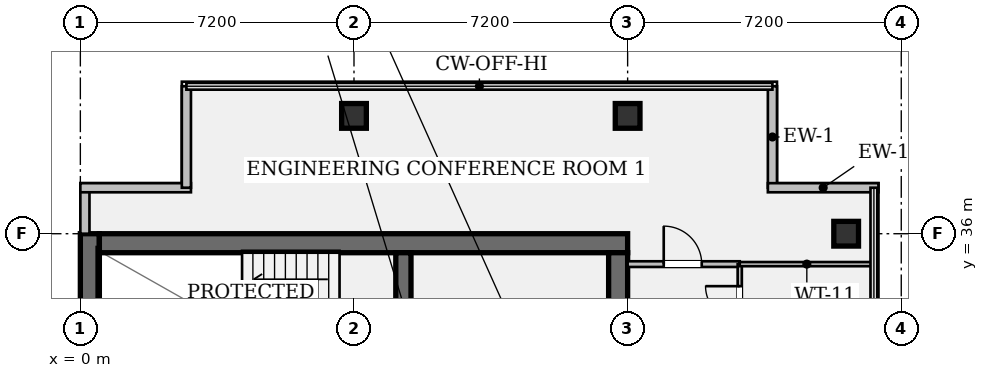
"""IFC4 building model, lengths in metres.
Left out: names, types, materials, properties, quantities, classifications, styles, units other than length and angle.
Written with IfcOpenShell. Run it as: python <this file> out.ifc"""

import sys

from ifc_helpers import new_model, si_unit, direction, frame, frame_2d, origin, origin_2d, place, context, subcontext, project, spatial, rectangle, hollow_rectangle, extrude, element, fill, save


model = new_model("IFC4")
c1 = context("Model", 3, precision=1e-05, world=origin(), true_north=direction((0.0, 1.0)))
c2 = subcontext(c1, "Body", "Model", "MODEL_VIEW")
j1 = project(units=[si_unit("LENGTHUNIT", "METRE"), si_unit("PLANEANGLEUNIT", "RADIAN")], contexts=[c1])
p1 = place(None, origin())
s1 = spatial("IfcSite", under=j1, at=p1, CompositionType="ELEMENT")
p2 = place(p1, origin())
s2 = spatial("IfcBuilding", under=s1, at=p2, CompositionType="ELEMENT")
p3 = place(p2, frame((0.0, 0.0, 279.65)))
s3 = spatial("IfcBuildingStorey", under=s2, at=p3, CompositionType="ELEMENT", Elevation=279.65)
p4 = place(p3, frame((0.25, 7.2, 0.0), z_axis=(0.0, 0.0, 1.0), x_axis=(0.0, 1.0, 0.0)))
e1 = element("IfcWall", 1, at=p4, inside=s3, PredefinedType="SHEAR", context=c2, shape_type="SweptSolid", body=[
    extrude(rectangle(XDim=28.8, YDim=0.5, at=frame_2d((14.4, 0.0))), origin(), (0.0, 0.0, 1.0), 3.24),
])
p5 = place(p3, frame((0.5, 35.75, 0.0), z_axis=(0.0, 0.0, 1.0), x_axis=(1.0, 0.0, 0.0)))
e2 = element("IfcWall", 2, at=p5, inside=s3, PredefinedType="SHEAR", context=c2, shape_type="SweptSolid", body=[
    extrude(rectangle(XDim=13.9, YDim=0.5, at=frame_2d((6.95, 0.0))), origin(), (0.0, 0.0, 1.0), 3.24),
])
p6 = place(p3, frame((14.15, 35.5, 0.0), z_axis=(0.0, 0.0, 1.0), x_axis=(0.0, -1.0, 0.0)))
e3 = element("IfcWall", 3, at=p6, inside=s3, PredefinedType="SHEAR", context=c2, shape_type="SweptSolid", body=[
    extrude(rectangle(XDim=27.8, YDim=0.5, at=frame_2d((13.9, 0.0))), origin(), (0.0, 0.0, 1.0), 3.24),
])
p7 = place(p6, frame((1.4, 0.0, 0.0)))
e4 = element("IfcOpeningElement", 4, at=p7, cuts=e3, PredefinedType="OPENING", context=c2, shape_type="SweptSolid", body=[
    extrude(rectangle(XDim=1.2, YDim=2.15, at=frame_2d((0.6, 1.075))), frame((0.0, 0.262, 0.0), z_axis=(0.0, -1.0, 0.0), x_axis=(1.0, 0.0, 0.0)), (0.0, 0.0, 1.0), 0.524),
])
p8 = place(p6, frame((25.35, 0.0, 0.0)))
e5 = element("IfcOpeningElement", 5, at=p8, cuts=e3, PredefinedType="OPENING", context=c2, shape_type="SweptSolid", body=[
    extrude(rectangle(XDim=1.2, YDim=2.15, at=frame_2d((0.6, 1.075))), frame((0.0, 0.262, 0.0), z_axis=(0.0, -1.0, 0.0), x_axis=(1.0, 0.0, 0.0)), (0.0, 0.0, 1.0), 0.524),
])
p9 = place(p6, frame((14.7, 0.0, 0.0)))
e6 = element("IfcOpeningElement", 6, at=p9, cuts=e3, PredefinedType="OPENING", context=c2, shape_type="SweptSolid", body=[
    extrude(rectangle(XDim=1.6, YDim=2.2, at=frame_2d((0.8, 1.1))), frame((0.0, 0.262, 0.0), z_axis=(0.0, -1.0, 0.0), x_axis=(1.0, 0.0, 0.0)), (0.0, 0.0, 1.0), 0.524),
])
p10 = place(p3, frame((8.5, 31.72, 0.0), z_axis=(0.0, 0.0, 1.0), x_axis=(0.0, 1.0, 0.0)))
e7 = element("IfcWall", 7, at=p10, inside=s3, PredefinedType="SHEAR", context=c2, shape_type="SweptSolid", body=[
    extrude(rectangle(XDim=3.78, YDim=0.4, at=frame_2d((1.89, 0.0))), origin(), (0.0, 0.0, 1.0), 3.24),
])
p11 = place(p10, frame((0.9, 0.0, 0.0)))
e8 = element("IfcOpeningElement", 8, at=p11, cuts=e7, PredefinedType="OPENING", context=c2, shape_type="SweptSolid", body=[
    extrude(rectangle(XDim=1.1, YDim=2.15, at=frame_2d((0.55, 1.075))), frame((0.0, 0.212, 0.0), z_axis=(0.0, -1.0, 0.0), x_axis=(1.0, 0.0, 0.0)), (0.0, 0.0, 1.0), 0.424),
])
for number, where, z_axis, x_axis in (
    (9, (7.2, 39.1, 0.0), (0.0, 0.0, 1.0), (1.0, 0.0, 0.0)),
    (10, (14.4, 39.1, 0.0), (0.0, 0.0, 1.0), (1.0, 0.0, 0.0)),
    (11, (20.15, 36.0, 0.0), (0.0, 0.0, 1.0), (1.0, 0.0, 0.0)),
):
    element("IfcColumn", number, at=place(p3, frame(where, z_axis=z_axis, x_axis=x_axis)), inside=s3, PredefinedType="COLUMN", context=c2, shape_type="SweptSolid", body=[
        extrude(hollow_rectangle(XDim=0.65, YDim=0.65, WallThickness=0.04, at=origin_2d()), origin(), (0.0, 0.0, 1.0), 3.24),
    ])
p12 = place(p3, frame((0.12, 36.0, 0.0), z_axis=(0.0, 0.0, 1.0), x_axis=(0.0, 1.0, 0.0)))
e12 = element("IfcWall", 12, at=p12, inside=s3, PredefinedType="STANDARD", context=c2, shape_type="SweptSolid", body=[
    extrude(rectangle(XDim=1.21, YDim=0.24, at=frame_2d((0.605, 0.0))), origin(), (0.0, 0.0, 1.0), 3.24),
])
p13 = place(p3, frame((0.0, 37.21, 0.0), z_axis=(0.0, 0.0, 1.0), x_axis=(1.0, 0.0, 0.0)))
e13 = element("IfcWall", 13, at=p13, inside=s3, PredefinedType="STANDARD", context=c2, shape_type="SweptSolid", body=[
    extrude(rectangle(XDim=2.91, YDim=0.24, at=frame_2d((1.455, 0.0))), origin(), (0.0, 0.0, 1.0), 3.24),
])
for number, where, z_axis, x_axis in (
    (14, (2.79, 37.21, 0.0), (0.0, 0.0, 1.0), (0.0, 1.0, 0.0)),
    (15, (18.21, 39.88, 0.0), (0.0, 0.0, 1.0), (0.0, -1.0, 0.0)),
):
    element("IfcWall", number, at=place(p3, frame(where, z_axis=z_axis, x_axis=x_axis)), inside=s3, PredefinedType="STANDARD", context=c2, shape_type="SweptSolid", body=[
        extrude(rectangle(XDim=2.67, YDim=0.24, at=frame_2d((1.335, 0.0))), origin(), (0.0, 0.0, 1.0), 3.24),
    ])
p14 = place(p3, frame((18.09, 37.21, 0.0), z_axis=(0.0, 0.0, 1.0), x_axis=(1.0, 0.0, 0.0)))
e16 = element("IfcWall", 16, at=p14, inside=s3, PredefinedType="STANDARD", context=c2, shape_type="SweptSolid", body=[
    extrude(rectangle(XDim=2.91, YDim=0.24, at=frame_2d((1.455, 0.0))), origin(), (0.0, 0.0, 1.0), 3.24),
])
p15 = place(p3, frame((14.4, 35.2, 0.0), z_axis=(0.0, 0.0, 1.0), x_axis=(1.0, 0.0, 0.0)))
e17 = element("IfcWall", 17, at=p15, inside=s3, PredefinedType="PARTITIONING", context=c2, shape_type="SweptSolid", body=[
    extrude(rectangle(XDim=2.95, YDim=0.15, at=frame_2d((1.475, 0.0))), origin(), (0.0, 0.0, 1.0), 2.808),
])
p16 = place(p15, frame((0.95, 0.0, 0.0)))
e18 = element("IfcOpeningElement", 18, at=p16, cuts=e17, PredefinedType="OPENING", context=c2, shape_type="SweptSolid", body=[
    extrude(rectangle(XDim=1.0, YDim=2.15, at=frame_2d((0.5, 1.075))), frame((0.0, 0.087, 0.0), z_axis=(0.0, -1.0, 0.0), x_axis=(1.0, 0.0, 0.0)), (0.0, 0.0, 1.0), 0.174),
])
p17 = place(p3, frame((17.35, 17.75, 0.0), z_axis=(0.0, 0.0, 1.0), x_axis=(0.0, 1.0, 0.0)))
e19 = element("IfcWall", 19, at=p17, inside=s3, PredefinedType="PARTITIONING", context=c2, shape_type="SweptSolid", body=[
    extrude(rectangle(XDim=17.45, YDim=0.11, at=frame_2d((8.725, 0.0))), origin(), (0.0, 0.0, 1.0), 2.676),
])
p18 = place(p17, frame((6.23, 0.0, 0.0)))
e20 = element("IfcOpeningElement", 20, at=p18, cuts=e19, PredefinedType="OPENING", context=c2, shape_type="SweptSolid", body=[
    extrude(rectangle(XDim=0.9, YDim=2.15, at=frame_2d((0.45, 1.075))), frame((0.0, 0.067, 0.0), z_axis=(0.0, -1.0, 0.0), x_axis=(1.0, 0.0, 0.0)), (0.0, 0.0, 1.0), 0.134),
])
p19 = place(p17, frame((9.48, 0.0, 0.0)))
e21 = element("IfcOpeningElement", 21, at=p19, cuts=e19, PredefinedType="OPENING", context=c2, shape_type="SweptSolid", body=[
    extrude(rectangle(XDim=0.9, YDim=2.15, at=frame_2d((0.45, 1.075))), frame((0.0, 0.067, 0.0), z_axis=(0.0, -1.0, 0.0), x_axis=(1.0, 0.0, 0.0)), (0.0, 0.0, 1.0), 0.134),
])
p20 = place(p17, frame((12.73, 0.0, 0.0)))
e22 = element("IfcOpeningElement", 22, at=p20, cuts=e19, PredefinedType="OPENING", context=c2, shape_type="SweptSolid", body=[
    extrude(rectangle(XDim=0.9, YDim=2.15, at=frame_2d((0.45, 1.075))), frame((0.0, 0.067, 0.0), z_axis=(0.0, -1.0, 0.0), x_axis=(1.0, 0.0, 0.0)), (0.0, 0.0, 1.0), 0.134),
])
p21 = place(p17, frame((15.97, 0.0, 0.0)))
e23 = element("IfcOpeningElement", 23, at=p21, cuts=e19, PredefinedType="OPENING", context=c2, shape_type="SweptSolid", body=[
    extrude(rectangle(XDim=0.9, YDim=2.15, at=frame_2d((0.45, 1.075))), frame((0.0, 0.067, 0.0), z_axis=(0.0, -1.0, 0.0), x_axis=(1.0, 0.0, 0.0)), (0.0, 0.0, 1.0), 0.134),
])
p22 = place(p3, frame((17.35, 35.2, 0.0), z_axis=(0.0, 0.0, 1.0), x_axis=(1.0, 0.0, 0.0)))
e24 = element("IfcWall", 24, at=p22, inside=s3, PredefinedType="PARTITIONING", context=c2, shape_type="SweptSolid", body=[
    extrude(rectangle(XDim=3.53, YDim=0.11, at=frame_2d((1.765, 0.0))), origin(), (0.0, 0.0, 1.0), 2.808),
])
p23 = place(p3, frame((20.9, 22.7, 0.0), z_axis=(0.0, 0.0, 1.0), x_axis=(0.0, 1.0, 0.0)))
e25 = element("IfcWall", 25, at=p23, inside=s3, PredefinedType="PARTITIONING", context=c2, shape_type="SweptSolid", body=[
    extrude(rectangle(XDim=12.5, YDim=0.15, at=frame_2d((6.25, 0.0))), origin(), (0.0, 0.0, 1.0), 3.24),
])
p24 = place(p16, origin())
e26 = element("IfcDoor", 26, at=p24, inside=s3, OperationType="SINGLE_SWING_LEFT", PredefinedType="DOOR", context=c2, shape_type="SweptSolid", body=[
    extrude(rectangle(XDim=1.0, YDim=2.15, at=frame_2d((0.5, 1.075))), frame((0.0, 0.025, 0.0), z_axis=(0.0, -1.0, 0.0), x_axis=(1.0, 0.0, 0.0)), (0.0, 0.0, 1.0), 0.05),
])
fill(e18, e26)
p25 = place(p21, origin())
e27 = element("IfcDoor", 27, at=p25, inside=s3, OperationType="SINGLE_SWING_RIGHT", PredefinedType="DOOR", context=c2, shape_type="SweptSolid", body=[
    extrude(rectangle(XDim=0.9, YDim=2.15, at=frame_2d((0.45, 1.075))), frame((0.0, 0.025, 0.0), z_axis=(0.0, -1.0, 0.0), x_axis=(1.0, 0.0, 0.0)), (0.0, 0.0, 1.0), 0.05),
])
fill(e23, e27)
save(model, sys.argv[1])
